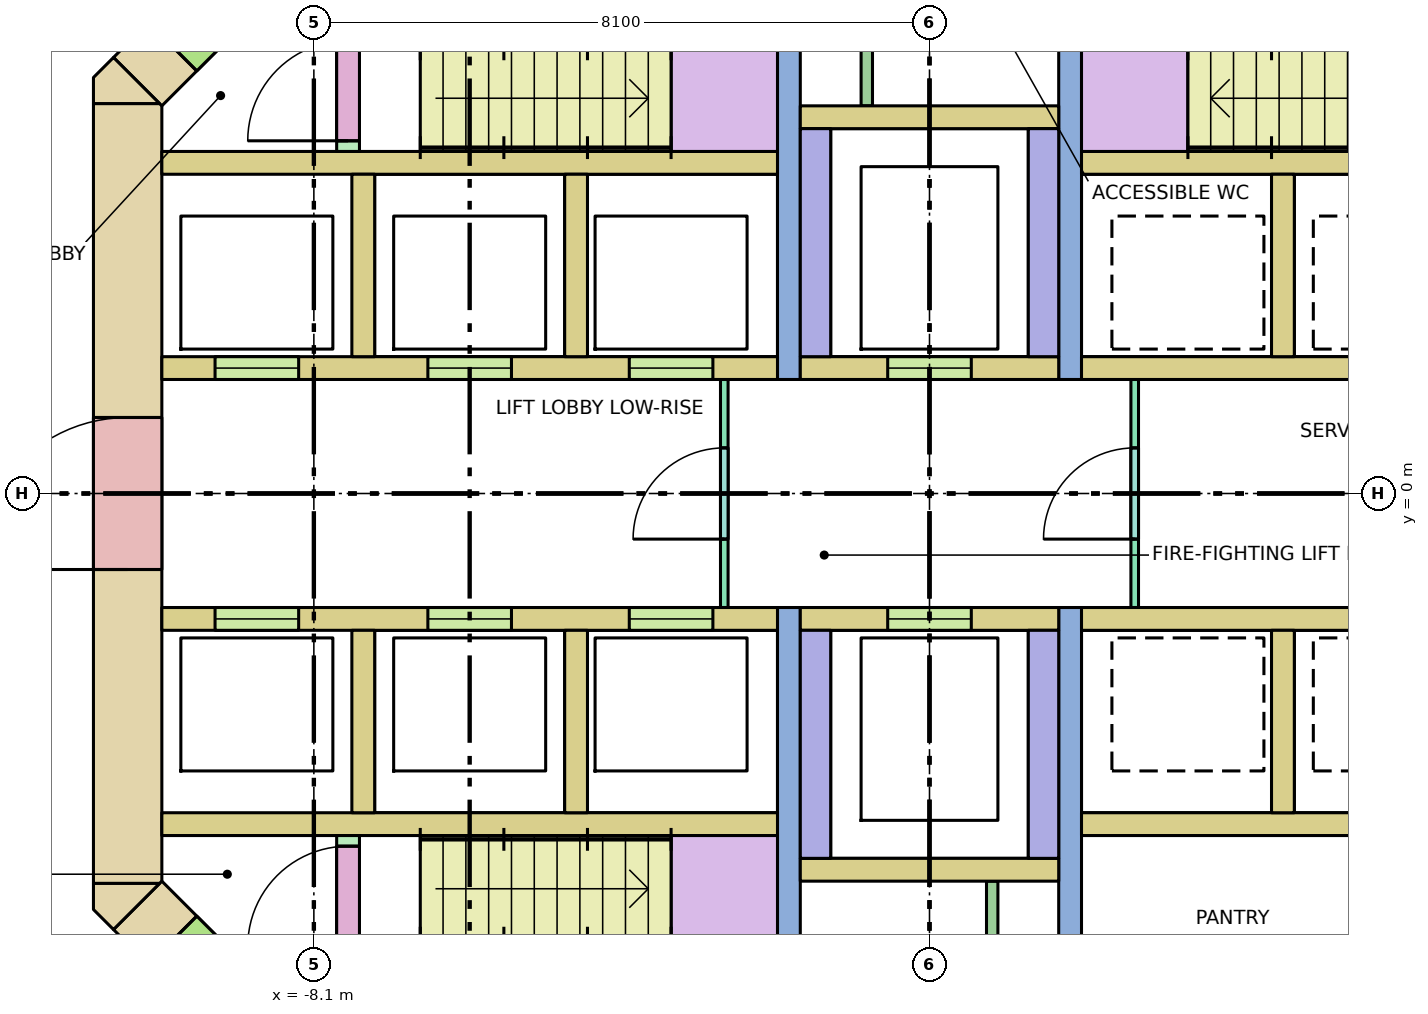
"""IFC4 building model, lengths in metres.
Left out: names, types, materials, properties, quantities, classifications, styles, units other than length and angle.
Written with IfcOpenShell. Run it as: python <this file> out.ifc"""

import sys

from ifc_helpers import new_model, si_unit, direction, frame, frame_2d, origin, place, context, subcontext, project, spatial, polyline, rectangle, outline, extrude, element, fill, save


model = new_model("IFC4")
c1 = context("Model", 3, precision=1e-05, world=origin(), true_north=direction((0.0, 1.0)))
c2 = subcontext(c1, "Body", "Model", "MODEL_VIEW")
j1 = project(units=[si_unit("LENGTHUNIT", "METRE"), si_unit("PLANEANGLEUNIT", "RADIAN")], contexts=[c1])
p1 = place(None, origin())
s1 = spatial("IfcSite", under=j1, at=p1, CompositionType="ELEMENT")
p2 = place(p1, origin())
s2 = spatial("IfcBuilding", under=s1, at=p2, CompositionType="ELEMENT")
p3 = place(p2, frame((0.0, 0.0, 86.6)))
s3 = spatial("IfcBuildingStorey", under=s2, at=p3, CompositionType="ELEMENT", Elevation=86.6)
p4 = place(p3, frame((-10.55, -5.13, -0.28), z_axis=(0.0, 0.0, 1.0), x_axis=(0.0, 1.0, 0.0)))
e1 = element("IfcWall", 1, at=p4, inside=s3, PredefinedType="SHEAR", context=c2, shape_type="SweptSolid", body=[
    extrude(rectangle(XDim=10.26, YDim=0.9, at=frame_2d((5.13, 0.0))), origin(), (0.0, 0.0, 1.0), 4.0),
])
p5 = place(p4, frame((4.13, 0.0, 0.28)))
e2 = element("IfcOpeningElement", 2, at=p5, cuts=e1, PredefinedType="OPENING", context=c2, shape_type="SweptSolid", body=[
    extrude(rectangle(XDim=2.0, YDim=2.1, at=frame_2d((1.0, 1.05))), frame((0.0, 0.46, 0.0), z_axis=(0.0, -1.0, 0.0), x_axis=(1.0, 0.0, 0.0)), (0.0, 0.0, 1.0), 0.92),
])
p6 = place(p3, frame((-10.418, 5.418, -0.28), z_axis=(0.0, 0.0, 1.0), x_axis=(0.707106781187, 0.707106781187, 0.0)))
e3 = element("IfcWall", 3, at=p6, inside=s3, PredefinedType="SHEAR", context=c2, shape_type="SweptSolid", body=[
    extrude(rectangle(XDim=4.243, YDim=0.9, at=frame_2d((2.121, 0.0))), origin(), (0.0, 0.0, 1.0), 4.0),
])
p7 = place(p6, frame((0.65, 0.0, 0.28)))
e4 = element("IfcOpeningElement", 4, at=p7, cuts=e3, PredefinedType="OPENING", context=c2, shape_type="SweptSolid", body=[
    extrude(rectangle(XDim=1.2, YDim=2.1, at=frame_2d((0.6, 1.05))), frame((0.0, 0.46, 0.0), z_axis=(0.0, -1.0, 0.0), x_axis=(1.0, 0.0, 0.0)), (0.0, 0.0, 1.0), 0.92),
])
p8 = place(p3, frame((-7.418, -8.418, -0.28), z_axis=(0.0, 0.0, 1.0), x_axis=(-0.707106781187, 0.707106781187, 0.0)))
e5 = element("IfcWall", 5, at=p8, inside=s3, PredefinedType="SHEAR", context=c2, shape_type="SweptSolid", body=[
    extrude(rectangle(XDim=4.243, YDim=0.9, at=frame_2d((2.121, 0.0))), origin(), (0.0, 0.0, 1.0), 4.0),
])
p9 = place(p8, frame((2.393, 0.0, 0.28)))
e6 = element("IfcOpeningElement", 6, at=p9, cuts=e5, PredefinedType="OPENING", context=c2, shape_type="SweptSolid", body=[
    extrude(rectangle(XDim=1.2, YDim=2.1, at=frame_2d((0.6, 1.05))), frame((0.0, 0.46, 0.0), z_axis=(0.0, -1.0, 0.0), x_axis=(1.0, 0.0, 0.0)), (0.0, 0.0, 1.0), 0.92),
])
p10 = place(p3, frame((0.0, 0.0, -0.28)))
e7 = element("IfcWall", 7, at=p10, inside=s3, PredefinedType="SHEAR", context=c2, shape_type="SweptSolid", body=[
    extrude(outline(polyline([(-11.0, -5.473), (-11.0, -5.13), (-10.13, -5.13), (-10.736, -5.736), (-11.0, -5.473)])), origin(), (0.0, 0.0, 1.0), 4.0),
])
p11 = place(p3, frame((0.0, 0.0, -0.28)))
e8 = element("IfcWall", 8, at=p11, inside=s3, PredefinedType="SHEAR", context=c2, shape_type="SweptSolid", body=[
    extrude(outline(polyline([(-10.736, 5.736), (-10.13, 5.13), (-11.0, 5.13), (-11.0, 5.473), (-10.736, 5.736)])), origin(), (0.0, 0.0, 1.0), 4.0),
])
for number, where, z_axis, x_axis in (
    (9, (-10.1, 4.35, 0.0), (0.0, 0.0, 1.0), (1.0, 0.0, 0.0)),
    (10, (-10.1, -4.35, 0.0), (0.0, 0.0, 1.0), (1.0, 0.0, 0.0)),
    (11, (2.0, 4.35, 0.0), (0.0, 0.0, 1.0), (1.0, 0.0, 0.0)),
    (12, (2.0, -4.35, 0.0), (0.0, 0.0, 1.0), (1.0, 0.0, 0.0)),
):
    element("IfcWall", number, at=place(p3, frame(where, z_axis=z_axis, x_axis=x_axis)), inside=s3, PredefinedType="SOLIDWALL", context=c2, shape_type="SweptSolid", body=[
        extrude(rectangle(XDim=8.1, YDim=0.3, at=frame_2d((4.05, 0.0))), origin(), (0.0, 0.0, 1.0), 3.72),
    ])
p12 = place(p3, frame((-10.1, 1.65, 0.0), z_axis=(0.0, 0.0, 1.0), x_axis=(1.0, 0.0, 0.0)))
e13 = element("IfcWall", 13, at=p12, inside=s3, PredefinedType="SOLIDWALL", context=c2, shape_type="SweptSolid", body=[
    extrude(rectangle(XDim=8.1, YDim=0.3, at=frame_2d((4.05, 0.0))), origin(), (0.0, 0.0, 1.0), 3.72),
])
p13 = place(p12, frame((0.7, 0.0, 0.0)))
e14 = element("IfcOpeningElement", 14, at=p13, cuts=e13, PredefinedType="OPENING", context=c2, shape_type="SweptSolid", body=[
    extrude(rectangle(XDim=1.1, YDim=2.1, at=frame_2d((0.55, 1.05))), frame((0.0, 0.16, 0.0), z_axis=(0.0, -1.0, 0.0), x_axis=(1.0, 0.0, 0.0)), (0.0, 0.0, 1.0), 0.32),
])
p14 = place(p12, frame((3.5, 0.0, 0.0)))
e15 = element("IfcOpeningElement", 15, at=p14, cuts=e13, PredefinedType="OPENING", context=c2, shape_type="SweptSolid", body=[
    extrude(rectangle(XDim=1.1, YDim=2.1, at=frame_2d((0.55, 1.05))), frame((0.0, 0.16, 0.0), z_axis=(0.0, -1.0, 0.0), x_axis=(1.0, 0.0, 0.0)), (0.0, 0.0, 1.0), 0.32),
])
p15 = place(p12, frame((6.15, 0.0, 0.0)))
e16 = element("IfcOpeningElement", 16, at=p15, cuts=e13, PredefinedType="OPENING", context=c2, shape_type="SweptSolid", body=[
    extrude(rectangle(XDim=1.1, YDim=2.1, at=frame_2d((0.55, 1.05))), frame((0.0, 0.16, 0.0), z_axis=(0.0, -1.0, 0.0), x_axis=(1.0, 0.0, 0.0)), (0.0, 0.0, 1.0), 0.32),
])
p16 = place(p3, frame((-10.1, -1.65, 0.0), z_axis=(0.0, 0.0, 1.0), x_axis=(1.0, 0.0, 0.0)))
e17 = element("IfcWall", 17, at=p16, inside=s3, PredefinedType="SOLIDWALL", context=c2, shape_type="SweptSolid", body=[
    extrude(rectangle(XDim=8.1, YDim=0.3, at=frame_2d((4.05, 0.0))), origin(), (0.0, 0.0, 1.0), 3.72),
])
p17 = place(p16, frame((0.7, 0.0, 0.0)))
e18 = element("IfcOpeningElement", 18, at=p17, cuts=e17, PredefinedType="OPENING", context=c2, shape_type="SweptSolid", body=[
    extrude(rectangle(XDim=1.1, YDim=2.1, at=frame_2d((0.55, 1.05))), frame((0.0, 0.16, 0.0), z_axis=(0.0, -1.0, 0.0), x_axis=(1.0, 0.0, 0.0)), (0.0, 0.0, 1.0), 0.32),
])
p18 = place(p16, frame((3.5, 0.0, 0.0)))
e19 = element("IfcOpeningElement", 19, at=p18, cuts=e17, PredefinedType="OPENING", context=c2, shape_type="SweptSolid", body=[
    extrude(rectangle(XDim=1.1, YDim=2.1, at=frame_2d((0.55, 1.05))), frame((0.0, 0.16, 0.0), z_axis=(0.0, -1.0, 0.0), x_axis=(1.0, 0.0, 0.0)), (0.0, 0.0, 1.0), 0.32),
])
p19 = place(p16, frame((6.15, 0.0, 0.0)))
e20 = element("IfcOpeningElement", 20, at=p19, cuts=e17, PredefinedType="OPENING", context=c2, shape_type="SweptSolid", body=[
    extrude(rectangle(XDim=1.1, YDim=2.1, at=frame_2d((0.55, 1.05))), frame((0.0, 0.16, 0.0), z_axis=(0.0, -1.0, 0.0), x_axis=(1.0, 0.0, 0.0)), (0.0, 0.0, 1.0), 0.32),
])
for number, where, z_axis, x_axis in (
    (21, (2.0, 1.65, 0.0), (0.0, 0.0, 1.0), (1.0, 0.0, 0.0)),
    (22, (2.0, -1.65, 0.0), (0.0, 0.0, 1.0), (1.0, 0.0, 0.0)),
):
    element("IfcWall", number, at=place(p3, frame(where, z_axis=z_axis, x_axis=x_axis)), inside=s3, PredefinedType="SOLIDWALL", context=c2, shape_type="SweptSolid", body=[
        extrude(rectangle(XDim=8.1, YDim=0.3, at=frame_2d((4.05, 0.0))), origin(), (0.0, 0.0, 1.0), 3.72),
    ])
for number, where, z_axis, x_axis in (
    (23, (-7.45, 1.8, 0.0), (0.0, 0.0, 1.0), (0.0, 1.0, 0.0)),
    (24, (-7.45, -4.2, 0.0), (0.0, 0.0, 1.0), (0.0, 1.0, 0.0)),
    (25, (-4.65, 1.8, 0.0), (0.0, 0.0, 1.0), (0.0, 1.0, 0.0)),
    (26, (-4.65, -4.2, 0.0), (0.0, 0.0, 1.0), (0.0, 1.0, 0.0)),
    (27, (4.65, 1.8, 0.0), (0.0, 0.0, 1.0), (0.0, 1.0, 0.0)),
    (28, (4.65, -4.2, 0.0), (0.0, 0.0, 1.0), (0.0, 1.0, 0.0)),
):
    element("IfcWall", number, at=place(p3, frame(where, z_axis=z_axis, x_axis=x_axis)), inside=s3, PredefinedType="SOLIDWALL", context=c2, shape_type="SweptSolid", body=[
        extrude(rectangle(XDim=2.4, YDim=0.3, at=frame_2d((1.2, 0.0))), origin(), (0.0, 0.0, 1.0), 3.72),
    ])
for number, where, z_axis, x_axis in (
    (29, (-1.85, 1.5, 0.0), (0.0, 0.0, 1.0), (0.0, 1.0, 0.0)),
    (30, (-1.85, -8.1, 0.0), (0.0, 0.0, 1.0), (0.0, 1.0, 0.0)),
    (31, (1.85, 1.5, 0.0), (0.0, 0.0, 1.0), (0.0, 1.0, 0.0)),
    (32, (1.85, -8.1, 0.0), (0.0, 0.0, 1.0), (0.0, 1.0, 0.0)),
):
    element("IfcWall", number, at=place(p3, frame(where, z_axis=z_axis, x_axis=x_axis)), inside=s3, PredefinedType="SHEAR", context=c2, shape_type="SweptSolid", body=[
        extrude(rectangle(XDim=6.6, YDim=0.3, at=frame_2d((3.3, 0.0))), origin(), (0.0, 0.0, 1.0), 3.72),
    ])
p20 = place(p3, frame((-1.7, 1.65, 0.0), z_axis=(0.0, 0.0, 1.0), x_axis=(1.0, 0.0, 0.0)))
e33 = element("IfcWall", 33, at=p20, inside=s3, PredefinedType="SOLIDWALL", context=c2, shape_type="SweptSolid", body=[
    extrude(rectangle(XDim=3.4, YDim=0.3, at=frame_2d((1.7, 0.0))), origin(), (0.0, 0.0, 1.0), 3.72),
])
p21 = place(p20, frame((1.15, 0.0, 0.0)))
e34 = element("IfcOpeningElement", 34, at=p21, cuts=e33, PredefinedType="OPENING", context=c2, shape_type="SweptSolid", body=[
    extrude(rectangle(XDim=1.1, YDim=2.1, at=frame_2d((0.55, 1.05))), frame((0.0, 0.16, 0.0), z_axis=(0.0, -1.0, 0.0), x_axis=(1.0, 0.0, 0.0)), (0.0, 0.0, 1.0), 0.32),
])
p22 = place(p3, frame((-1.7, -1.65, 0.0), z_axis=(0.0, 0.0, 1.0), x_axis=(1.0, 0.0, 0.0)))
e35 = element("IfcWall", 35, at=p22, inside=s3, PredefinedType="SOLIDWALL", context=c2, shape_type="SweptSolid", body=[
    extrude(rectangle(XDim=3.4, YDim=0.3, at=frame_2d((1.7, 0.0))), origin(), (0.0, 0.0, 1.0), 3.72),
])
p23 = place(p22, frame((1.15, 0.0, 0.0)))
e36 = element("IfcOpeningElement", 36, at=p23, cuts=e35, PredefinedType="OPENING", context=c2, shape_type="SweptSolid", body=[
    extrude(rectangle(XDim=1.1, YDim=2.1, at=frame_2d((0.55, 1.05))), frame((0.0, 0.16, 0.0), z_axis=(0.0, -1.0, 0.0), x_axis=(1.0, 0.0, 0.0)), (0.0, 0.0, 1.0), 0.32),
])
for number, where, z_axis, x_axis in (
    (37, (-1.5, 1.8, 0.0), (0.0, 0.0, 1.0), (0.0, 1.0, 0.0)),
    (38, (-1.5, -4.8, 0.0), (0.0, 0.0, 1.0), (0.0, 1.0, 0.0)),
    (39, (1.5, 1.8, 0.0), (0.0, 0.0, 1.0), (0.0, 1.0, 0.0)),
    (40, (1.5, -4.8, 0.0), (0.0, 0.0, 1.0), (0.0, 1.0, 0.0)),
):
    element("IfcWall", number, at=place(p3, frame(where, z_axis=z_axis, x_axis=x_axis)), inside=s3, PredefinedType="SOLIDWALL", context=c2, shape_type="SweptSolid", body=[
        extrude(rectangle(XDim=3.0, YDim=0.4, at=frame_2d((1.5, 0.0))), origin(), (0.0, 0.0, 1.0), 3.72),
    ])
for number, where, z_axis, x_axis in (
    (41, (-1.7, 4.95, 0.0), (0.0, 0.0, 1.0), (1.0, 0.0, 0.0)),
    (42, (-1.7, -4.95, 0.0), (0.0, 0.0, 1.0), (1.0, 0.0, 0.0)),
):
    element("IfcWall", number, at=place(p3, frame(where, z_axis=z_axis, x_axis=x_axis)), inside=s3, PredefinedType="SOLIDWALL", context=c2, shape_type="SweptSolid", body=[
        extrude(rectangle(XDim=3.4, YDim=0.3, at=frame_2d((1.7, 0.0))), origin(), (0.0, 0.0, 1.0), 3.72),
    ])
p24 = place(p3, frame((-7.65, 4.5, 0.0), z_axis=(0.0, 0.0, 1.0), x_axis=(0.0, 1.0, 0.0)))
e43 = element("IfcWall", 43, at=p24, inside=s3, PredefinedType="SHEAR", context=c2, shape_type="SweptSolid", body=[
    extrude(rectangle(XDim=3.14, YDim=0.3, at=frame_2d((1.57, 0.0))), origin(), (0.0, 0.0, 1.0), 3.72),
])
p25 = place(p24, frame((0.14, 0.0, 0.0)))
e44 = element("IfcOpeningElement", 44, at=p25, cuts=e43, PredefinedType="OPENING", context=c2, shape_type="SweptSolid", body=[
    extrude(rectangle(XDim=1.32, YDim=2.1, at=frame_2d((0.66, 1.05))), frame((0.0, 0.16, 0.0), z_axis=(0.0, -1.0, 0.0), x_axis=(1.0, 0.0, 0.0)), (0.0, 0.0, 1.0), 0.32),
])
p26 = place(p3, frame((-7.65, -7.64, 0.0), z_axis=(0.0, 0.0, 1.0), x_axis=(0.0, 1.0, 0.0)))
e45 = element("IfcWall", 45, at=p26, inside=s3, PredefinedType="SHEAR", context=c2, shape_type="SweptSolid", body=[
    extrude(rectangle(XDim=3.14, YDim=0.3, at=frame_2d((1.57, 0.0))), origin(), (0.0, 0.0, 1.0), 3.72),
])
p27 = place(p26, frame((1.68, 0.0, 0.0)))
e46 = element("IfcOpeningElement", 46, at=p27, cuts=e45, PredefinedType="OPENING", context=c2, shape_type="SweptSolid", body=[
    extrude(rectangle(XDim=1.32, YDim=2.1, at=frame_2d((0.66, 1.05))), frame((0.0, 0.16, 0.0), z_axis=(0.0, -1.0, 0.0), x_axis=(1.0, 0.0, 0.0)), (0.0, 0.0, 1.0), 0.32),
])
p28 = place(p3, frame((-2.7, -1.5, 0.0), z_axis=(0.0, 0.0, 1.0), x_axis=(0.0, 1.0, 0.0)))
e47 = element("IfcWall", 47, at=p28, inside=s3, PredefinedType="PARTITIONING", context=c2, shape_type="SweptSolid", body=[
    extrude(rectangle(XDim=3.0, YDim=0.1, at=frame_2d((1.5, 0.0))), origin(), (0.0, 0.0, 1.0), 3.72),
])
p29 = place(p28, frame((0.9, 0.0, 0.0)))
e48 = element("IfcOpeningElement", 48, at=p29, cuts=e47, PredefinedType="OPENING", context=c2, shape_type="SweptSolid", body=[
    extrude(rectangle(XDim=1.2, YDim=2.1, at=frame_2d((0.6, 1.05))), frame((0.0, 0.06, 0.0), z_axis=(0.0, -1.0, 0.0), x_axis=(1.0, 0.0, 0.0)), (0.0, 0.0, 1.0), 0.12),
])
p30 = place(p3, frame((2.7, -1.5, 0.0), z_axis=(0.0, 0.0, 1.0), x_axis=(0.0, 1.0, 0.0)))
e49 = element("IfcWall", 49, at=p30, inside=s3, PredefinedType="PARTITIONING", context=c2, shape_type="SweptSolid", body=[
    extrude(rectangle(XDim=3.0, YDim=0.1, at=frame_2d((1.5, 0.0))), origin(), (0.0, 0.0, 1.0), 3.72),
])
p31 = place(p30, frame((0.9, 0.0, 0.0)))
e50 = element("IfcOpeningElement", 50, at=p31, cuts=e49, PredefinedType="OPENING", context=c2, shape_type="SweptSolid", body=[
    extrude(rectangle(XDim=1.2, YDim=2.1, at=frame_2d((0.6, 1.05))), frame((0.0, 0.06, 0.0), z_axis=(0.0, -1.0, 0.0), x_axis=(1.0, 0.0, 0.0)), (0.0, 0.0, 1.0), 0.12),
])
for number, where, z_axis, x_axis in (
    (51, (-0.825, 5.1, 0.0), (0.0, 0.0, 1.0), (0.0, 1.0, 0.0)),
    (52, (0.825, -8.1, 0.0), (0.0, 0.0, 1.0), (0.0, 1.0, 0.0)),
):
    element("IfcWall", number, at=place(p3, frame(where, z_axis=z_axis, x_axis=x_axis)), inside=s3, PredefinedType="PARTITIONING", context=c2, shape_type="SweptSolid", body=[
        extrude(rectangle(XDim=3.0, YDim=0.15, at=frame_2d((1.5, 0.0))), origin(), (0.0, 0.0, 1.0), 3.72),
    ])
p32 = place(p13, origin())
e53 = element("IfcDoor", 53, at=p32, inside=s3, OperationType="DOUBLE_DOOR_SLIDING", PredefinedType="DOOR", context=c2, shape_type="SweptSolid", body=[
    extrude(rectangle(XDim=1.1, YDim=2.1, at=frame_2d((0.55, 1.05))), frame((0.0, 0.025, 0.0), z_axis=(0.0, -1.0, 0.0), x_axis=(1.0, 0.0, 0.0)), (0.0, 0.0, 1.0), 0.05),
])
fill(e14, e53)
p33 = place(p14, origin())
e54 = element("IfcDoor", 54, at=p33, inside=s3, OperationType="DOUBLE_DOOR_SLIDING", PredefinedType="DOOR", context=c2, shape_type="SweptSolid", body=[
    extrude(rectangle(XDim=1.1, YDim=2.1, at=frame_2d((0.55, 1.05))), frame((0.0, 0.025, 0.0), z_axis=(0.0, -1.0, 0.0), x_axis=(1.0, 0.0, 0.0)), (0.0, 0.0, 1.0), 0.05),
])
fill(e15, e54)
p34 = place(p15, origin())
e55 = element("IfcDoor", 55, at=p34, inside=s3, OperationType="DOUBLE_DOOR_SLIDING", PredefinedType="DOOR", context=c2, shape_type="SweptSolid", body=[
    extrude(rectangle(XDim=1.1, YDim=2.1, at=frame_2d((0.55, 1.05))), frame((0.0, 0.025, 0.0), z_axis=(0.0, -1.0, 0.0), x_axis=(1.0, 0.0, 0.0)), (0.0, 0.0, 1.0), 0.05),
])
fill(e16, e55)
p35 = place(p17, origin())
e56 = element("IfcDoor", 56, at=p35, inside=s3, OperationType="DOUBLE_DOOR_SLIDING", PredefinedType="DOOR", context=c2, shape_type="SweptSolid", body=[
    extrude(rectangle(XDim=1.1, YDim=2.1, at=frame_2d((0.55, 1.05))), frame((0.0, 0.025, 0.0), z_axis=(0.0, -1.0, 0.0), x_axis=(1.0, 0.0, 0.0)), (0.0, 0.0, 1.0), 0.05),
])
fill(e18, e56)
p36 = place(p18, origin())
e57 = element("IfcDoor", 57, at=p36, inside=s3, OperationType="DOUBLE_DOOR_SLIDING", PredefinedType="DOOR", context=c2, shape_type="SweptSolid", body=[
    extrude(rectangle(XDim=1.1, YDim=2.1, at=frame_2d((0.55, 1.05))), frame((0.0, 0.025, 0.0), z_axis=(0.0, -1.0, 0.0), x_axis=(1.0, 0.0, 0.0)), (0.0, 0.0, 1.0), 0.05),
])
fill(e19, e57)
p37 = place(p19, origin())
e58 = element("IfcDoor", 58, at=p37, inside=s3, OperationType="DOUBLE_DOOR_SLIDING", PredefinedType="DOOR", context=c2, shape_type="SweptSolid", body=[
    extrude(rectangle(XDim=1.1, YDim=2.1, at=frame_2d((0.55, 1.05))), frame((0.0, 0.025, 0.0), z_axis=(0.0, -1.0, 0.0), x_axis=(1.0, 0.0, 0.0)), (0.0, 0.0, 1.0), 0.05),
])
fill(e20, e58)
p38 = place(p21, origin())
e59 = element("IfcDoor", 59, at=p38, inside=s3, OperationType="DOUBLE_DOOR_SLIDING", PredefinedType="DOOR", context=c2, shape_type="SweptSolid", body=[
    extrude(rectangle(XDim=1.1, YDim=2.1, at=frame_2d((0.55, 1.05))), frame((0.0, 0.025, 0.0), z_axis=(0.0, -1.0, 0.0), x_axis=(1.0, 0.0, 0.0)), (0.0, 0.0, 1.0), 0.05),
])
fill(e34, e59)
p39 = place(p23, origin())
e60 = element("IfcDoor", 60, at=p39, inside=s3, OperationType="DOUBLE_DOOR_SLIDING", PredefinedType="DOOR", context=c2, shape_type="SweptSolid", body=[
    extrude(rectangle(XDim=1.1, YDim=2.1, at=frame_2d((0.55, 1.05))), frame((0.0, 0.025, 0.0), z_axis=(0.0, -1.0, 0.0), x_axis=(1.0, 0.0, 0.0)), (0.0, 0.0, 1.0), 0.05),
])
fill(e36, e60)
p40 = place(p25, origin())
e61 = element("IfcDoor", 61, at=p40, inside=s3, OperationType="DOUBLE_DOOR_SINGLE_SWING", PredefinedType="DOOR", context=c2, shape_type="SweptSolid", body=[
    extrude(rectangle(XDim=1.32, YDim=2.1, at=frame_2d((0.66, 1.05))), frame((0.0, 0.025, 0.0), z_axis=(0.0, -1.0, 0.0), x_axis=(1.0, 0.0, 0.0)), (0.0, 0.0, 1.0), 0.05),
])
fill(e44, e61)
p41 = place(p27, origin())
e62 = element("IfcDoor", 62, at=p41, inside=s3, OperationType="DOUBLE_DOOR_SINGLE_SWING", PredefinedType="DOOR", context=c2, shape_type="SweptSolid", body=[
    extrude(rectangle(XDim=1.32, YDim=2.1, at=frame_2d((0.66, 1.05))), frame((0.0, 0.025, 0.0), z_axis=(0.0, -1.0, 0.0), x_axis=(1.0, 0.0, 0.0)), (0.0, 0.0, 1.0), 0.05),
])
fill(e46, e62)
p42 = place(p5, origin())
e63 = element("IfcDoor", 63, at=p42, inside=s3, OperationType="DOUBLE_DOOR_SINGLE_SWING", PredefinedType="DOOR", context=c2, shape_type="SweptSolid", body=[
    extrude(rectangle(XDim=2.0, YDim=2.1, at=frame_2d((1.0, 1.05))), frame((0.0, 0.025, 0.0), z_axis=(0.0, -1.0, 0.0), x_axis=(1.0, 0.0, 0.0)), (0.0, 0.0, 1.0), 0.05),
])
fill(e2, e63)
p43 = place(p29, origin())
e64 = element("IfcDoor", 64, at=p43, inside=s3, OperationType="SINGLE_SWING_LEFT", PredefinedType="DOOR", context=c2, shape_type="SweptSolid", body=[
    extrude(rectangle(XDim=1.2, YDim=2.1, at=frame_2d((0.6, 1.05))), frame((0.0, 0.025, 0.0), z_axis=(0.0, -1.0, 0.0), x_axis=(1.0, 0.0, 0.0)), (0.0, 0.0, 1.0), 0.05),
])
fill(e48, e64)
p44 = place(p31, origin())
e65 = element("IfcDoor", 65, at=p44, inside=s3, OperationType="SINGLE_SWING_LEFT", PredefinedType="DOOR", context=c2, shape_type="SweptSolid", body=[
    extrude(rectangle(XDim=1.2, YDim=2.1, at=frame_2d((0.6, 1.05))), frame((0.0, 0.025, 0.0), z_axis=(0.0, -1.0, 0.0), x_axis=(1.0, 0.0, 0.0)), (0.0, 0.0, 1.0), 0.05),
])
fill(e50, e65)
save(model, sys.argv[1])
